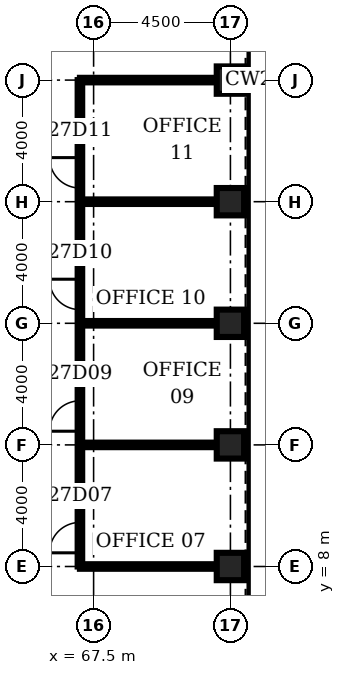
"""IFC4 building model, lengths in metres.
Left out: names, types, materials, properties, quantities, classifications, styles, units other than length and angle.
Written with IfcOpenShell. Run it as: python <this file> out.ifc"""

import sys

from ifc_helpers import new_model, si_unit, direction, frame, frame_2d, origin, origin_2d, place, context, subcontext, project, spatial, rectangle, hollow_rectangle, extrude, element, fill, save


model = new_model("IFC4")
c1 = context("Model", 3, precision=1e-05, world=origin(), true_north=direction((0.0, 1.0)))
c2 = subcontext(c1, "Body", "Model", "MODEL_VIEW")
j1 = project(units=[si_unit("LENGTHUNIT", "METRE"), si_unit("PLANEANGLEUNIT", "RADIAN")], contexts=[c1])
p1 = place(None, origin())
s1 = spatial("IfcSite", under=j1, at=p1, CompositionType="ELEMENT")
p2 = place(p1, origin())
s2 = spatial("IfcBuilding", under=s1, at=p2, CompositionType="ELEMENT")
p3 = place(p2, frame((0.0, 0.0, 125.7)))
s3 = spatial("IfcBuildingStorey", under=s2, at=p3, CompositionType="ELEMENT", Elevation=125.7)
for number, where, z_axis, x_axis in (
    (1, (72.0, 8.0, 0.0), (0.0, 0.0, 1.0), (1.0, 0.0, 0.0)),
    (2, (72.0, 12.0, 0.0), (0.0, 0.0, 1.0), (1.0, 0.0, 0.0)),
    (3, (72.0, 16.0, 0.0), (0.0, 0.0, 1.0), (1.0, 0.0, 0.0)),
    (4, (72.0, 20.0, 0.0), (0.0, 0.0, 1.0), (1.0, 0.0, 0.0)),
    (5, (72.0, 24.0, 0.0), (0.0, 0.0, 1.0), (1.0, 0.0, 0.0)),
):
    element("IfcColumn", number, at=place(p3, frame(where, z_axis=z_axis, x_axis=x_axis)), inside=s3, PredefinedType="COLUMN", context=c2, shape_type="SweptSolid", body=[
        extrude(hollow_rectangle(XDim=0.9, YDim=0.9, WallThickness=0.1, at=origin_2d()), origin(), (0.0, 0.0, 1.0), 4.2),
    ])
for number, where, z_axis, x_axis in (
    (6, (67.05, 8.0, 0.0), (0.0, 0.0, 1.0), (1.0, 0.0, 0.0)),
    (7, (67.05, 12.0, 0.0), (0.0, 0.0, 1.0), (1.0, 0.0, 0.0)),
    (8, (67.05, 16.0, 0.0), (0.0, 0.0, 1.0), (1.0, 0.0, 0.0)),
    (9, (67.05, 20.0, 0.0), (0.0, 0.0, 1.0), (1.0, 0.0, 0.0)),
    (10, (67.05, 24.0, 0.0), (0.0, 0.0, 1.0), (1.0, 0.0, 0.0)),
):
    element("IfcWall", number, at=place(p3, frame(where, z_axis=z_axis, x_axis=x_axis)), inside=s3, PredefinedType="PARTITIONING", context=c2, shape_type="SweptSolid", body=[
        extrude(rectangle(XDim=4.5, YDim=0.15, at=frame_2d((2.25, 0.0))), origin(), (0.0, 0.0, 1.0), 3.0),
    ])
p4 = place(p3, frame((67.05, 8.0, 0.0), z_axis=(0.0, 0.0, 1.0), x_axis=(0.0, 1.0, 0.0)))
e11 = element("IfcWall", 11, at=p4, inside=s3, PredefinedType="PARTITIONING", context=c2, shape_type="SweptSolid", body=[
    extrude(rectangle(XDim=16.0, YDim=0.15, at=frame_2d((8.0, 0.0))), origin(), (0.0, 0.0, 1.0), 3.0),
])
p5 = place(p4, frame((0.45, 0.0, 0.0)))
e12 = element("IfcOpeningElement", 12, at=p5, cuts=e11, PredefinedType="OPENING", context=c2, shape_type="SweptSolid", body=[
    extrude(rectangle(XDim=1.0, YDim=2.1, at=frame_2d((0.5, 1.05))), frame((0.0, 0.085, 0.0), z_axis=(0.0, -1.0, 0.0), x_axis=(1.0, 0.0, 0.0)), (0.0, 0.0, 1.0), 0.17),
])
p6 = place(p4, frame((4.45, 0.0, 0.0)))
e13 = element("IfcOpeningElement", 13, at=p6, cuts=e11, PredefinedType="OPENING", context=c2, shape_type="SweptSolid", body=[
    extrude(rectangle(XDim=1.0, YDim=2.1, at=frame_2d((0.5, 1.05))), frame((0.0, 0.085, 0.0), z_axis=(0.0, -1.0, 0.0), x_axis=(1.0, 0.0, 0.0)), (0.0, 0.0, 1.0), 0.17),
])
p7 = place(p4, frame((8.45, 0.0, 0.0)))
e14 = element("IfcOpeningElement", 14, at=p7, cuts=e11, PredefinedType="OPENING", context=c2, shape_type="SweptSolid", body=[
    extrude(rectangle(XDim=1.0, YDim=2.1, at=frame_2d((0.5, 1.05))), frame((0.0, 0.085, 0.0), z_axis=(0.0, -1.0, 0.0), x_axis=(1.0, 0.0, 0.0)), (0.0, 0.0, 1.0), 0.17),
])
p8 = place(p4, frame((12.45, 0.0, 0.0)))
e15 = element("IfcOpeningElement", 15, at=p8, cuts=e11, PredefinedType="OPENING", context=c2, shape_type="SweptSolid", body=[
    extrude(rectangle(XDim=1.0, YDim=2.1, at=frame_2d((0.5, 1.05))), frame((0.0, 0.085, 0.0), z_axis=(0.0, -1.0, 0.0), x_axis=(1.0, 0.0, 0.0)), (0.0, 0.0, 1.0), 0.17),
])
p9 = place(p5, origin())
e16 = element("IfcDoor", 16, at=p9, inside=s3, OperationType="SINGLE_SWING_LEFT", PredefinedType="DOOR", context=c2, shape_type="SweptSolid", body=[
    extrude(rectangle(XDim=1.0, YDim=2.1, at=frame_2d((0.5, 1.05))), frame((0.0, 0.025, 0.0), z_axis=(0.0, -1.0, 0.0), x_axis=(1.0, 0.0, 0.0)), (0.0, 0.0, 1.0), 0.05),
])
fill(e12, e16)
p10 = place(p6, origin())
e17 = element("IfcDoor", 17, at=p10, inside=s3, OperationType="SINGLE_SWING_LEFT", PredefinedType="DOOR", context=c2, shape_type="SweptSolid", body=[
    extrude(rectangle(XDim=1.0, YDim=2.1, at=frame_2d((0.5, 1.05))), frame((0.0, 0.025, 0.0), z_axis=(0.0, -1.0, 0.0), x_axis=(1.0, 0.0, 0.0)), (0.0, 0.0, 1.0), 0.05),
])
fill(e13, e17)
p11 = place(p7, origin())
e18 = element("IfcDoor", 18, at=p11, inside=s3, OperationType="SINGLE_SWING_RIGHT", PredefinedType="DOOR", context=c2, shape_type="SweptSolid", body=[
    extrude(rectangle(XDim=1.0, YDim=2.1, at=frame_2d((0.5, 1.05))), frame((0.0, 0.025, 0.0), z_axis=(0.0, -1.0, 0.0), x_axis=(1.0, 0.0, 0.0)), (0.0, 0.0, 1.0), 0.05),
])
fill(e14, e18)
p12 = place(p8, origin())
e19 = element("IfcDoor", 19, at=p12, inside=s3, OperationType="SINGLE_SWING_RIGHT", PredefinedType="DOOR", context=c2, shape_type="SweptSolid", body=[
    extrude(rectangle(XDim=1.0, YDim=2.1, at=frame_2d((0.5, 1.05))), frame((0.0, 0.025, 0.0), z_axis=(0.0, -1.0, 0.0), x_axis=(1.0, 0.0, 0.0)), (0.0, 0.0, 1.0), 0.05),
])
fill(e15, e19)
save(model, sys.argv[1])
